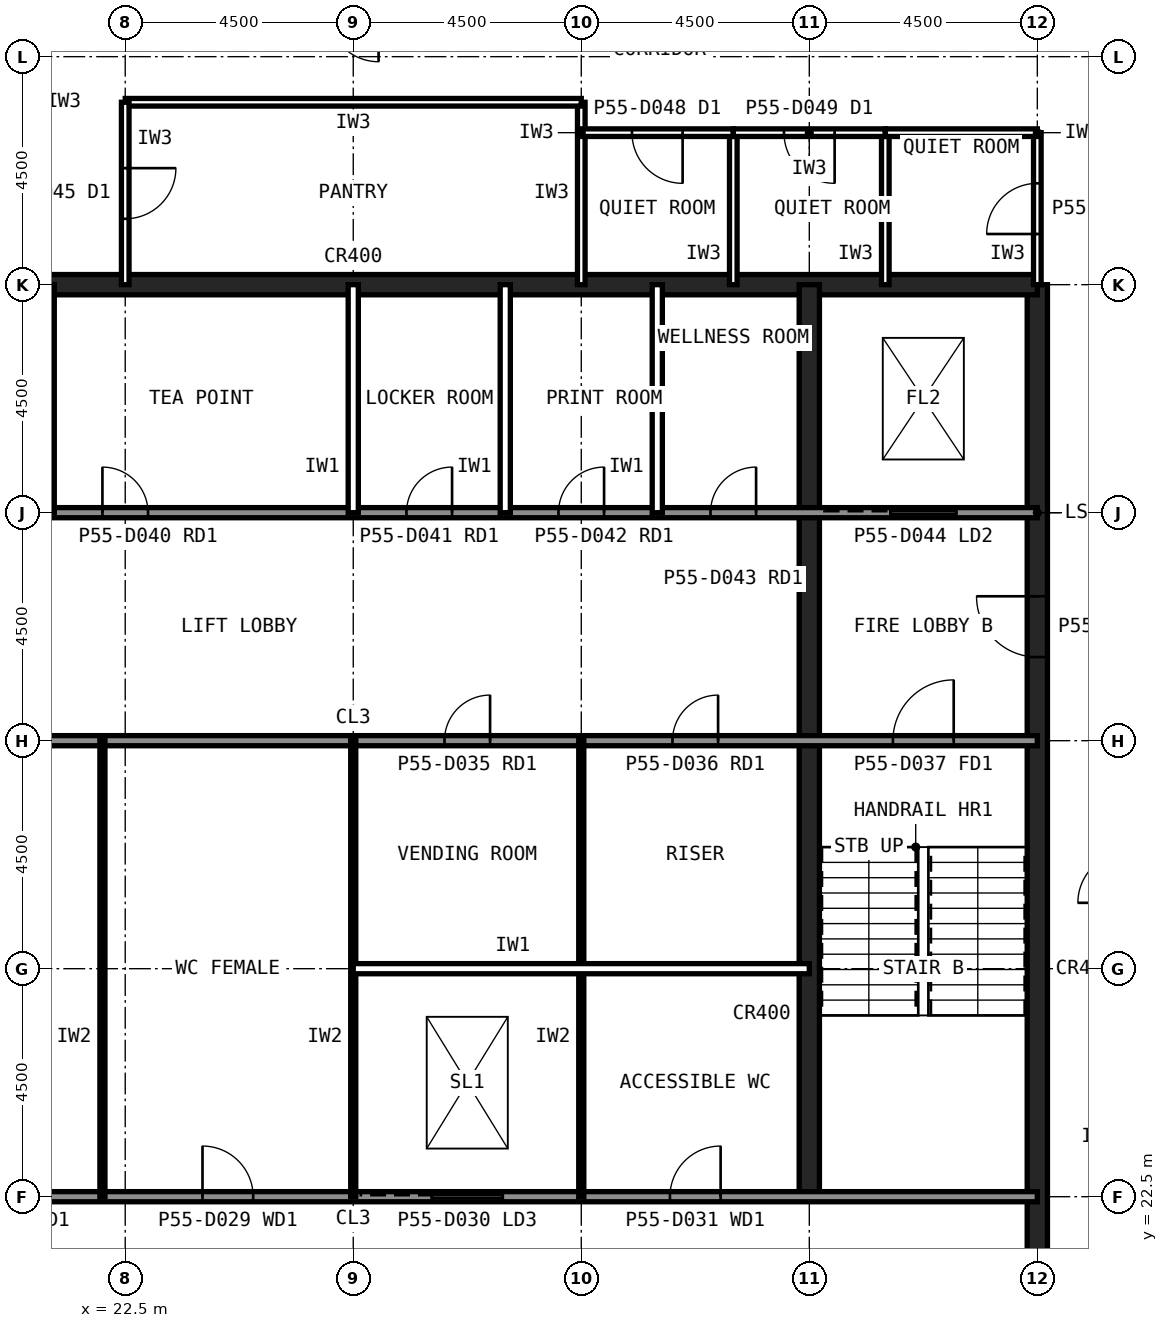
"""IFC4 building model, lengths in metres.
Left out: names, types, materials, properties, quantities, classifications, styles, units other than length and angle.
Written with IfcOpenShell. Run it as: python <this file> out.ifc"""

import sys

from ifc_helpers import new_model, si_unit, direction, frame, frame_2d, origin, place, context, subcontext, project, spatial, rectangle, extrude, element, fill, save


model = new_model("IFC4")
c1 = context("Model", 3, precision=1e-05, world=origin(), true_north=direction((0.0, 1.0)))
c2 = subcontext(c1, "Body", "Model", "MODEL_VIEW")
j1 = project(units=[si_unit("LENGTHUNIT", "METRE"), si_unit("PLANEANGLEUNIT", "RADIAN")], contexts=[c1])
p1 = place(None, origin())
s1 = spatial("IfcSite", under=j1, at=p1, CompositionType="ELEMENT")
p2 = place(p1, origin())
s2 = spatial("IfcBuilding", under=s1, at=p2, CompositionType="ELEMENT")
p3 = place(p2, frame((0.0, 0.0, 230.6)))
s3 = spatial("IfcBuildingStorey", under=s2, at=p3, CompositionType="ELEMENT", Elevation=230.6)
p4 = place(p3, frame((40.5, 13.5, 0.0), z_axis=(0.0, 0.0, 1.0), x_axis=(0.0, 1.0, 0.0)))
e1 = element("IfcWall", 1, at=p4, inside=s3, PredefinedType="SHEAR", context=c2, shape_type="SweptSolid", body=[
    extrude(rectangle(XDim=27.0, YDim=0.4, at=frame_2d((13.5, 0.0))), origin(), (0.0, 0.0, 1.0), 4.0),
])
p5 = place(p4, frame((5.85, 0.0, 0.0)))
e2 = element("IfcOpeningElement", 2, at=p5, cuts=e1, PredefinedType="OPENING", context=c2, shape_type="SweptSolid", body=[
    extrude(rectangle(XDim=1.8, YDim=2.1, at=frame_2d((0.9, 1.05))), frame((0.0, 0.21, 0.0), z_axis=(0.0, -1.0, 0.0), x_axis=(1.0, 0.0, 0.0)), (0.0, 0.0, 1.0), 0.42),
])
p6 = place(p4, frame((19.65, 0.0, 0.0)))
e3 = element("IfcOpeningElement", 3, at=p6, cuts=e1, PredefinedType="OPENING", context=c2, shape_type="SweptSolid", body=[
    extrude(rectangle(XDim=1.2, YDim=2.1, at=frame_2d((0.6, 1.05))), frame((0.0, 0.21, 0.0), z_axis=(0.0, -1.0, 0.0), x_axis=(1.0, 0.0, 0.0)), (0.0, 0.0, 1.0), 0.42),
])
p7 = place(p3, frame((40.5, 40.5, 0.0), z_axis=(0.0, 0.0, 1.0), x_axis=(-1.0, 0.0, 0.0)))
e4 = element("IfcWall", 4, at=p7, inside=s3, PredefinedType="SHEAR", context=c2, shape_type="SweptSolid", body=[
    extrude(rectangle(XDim=27.0, YDim=0.4, at=frame_2d((13.5, 0.0))), origin(), (0.0, 0.0, 1.0), 4.0),
])
p8 = place(p3, frame((36.0, 22.5, 0.0), z_axis=(0.0, 0.0, 1.0), x_axis=(0.0, 1.0, 0.0)))
e5 = element("IfcWall", 5, at=p8, inside=s3, PredefinedType="SHEAR", context=c2, shape_type="SweptSolid", body=[
    extrude(rectangle(XDim=18.0, YDim=0.4, at=frame_2d((9.0, 0.0))), origin(), (0.0, 0.0, 1.0), 4.0),
])
p9 = place(p3, frame((13.5, 36.0, 0.0), z_axis=(0.0, 0.0, 1.0), x_axis=(1.0, 0.0, 0.0)))
e6 = element("IfcWall", 6, at=p9, inside=s3, PredefinedType="SOLIDWALL", context=c2, shape_type="SweptSolid", body=[
    extrude(rectangle(XDim=27.0, YDim=0.2, at=frame_2d((13.5, 0.0))), origin(), (0.0, 0.0, 1.0), 3.84),
])
p10 = place(p9, frame((1.8, 0.0, 0.0)))
e7 = element("IfcOpeningElement", 7, at=p10, cuts=e6, PredefinedType="OPENING", context=c2, shape_type="SweptSolid", body=[
    extrude(rectangle(XDim=0.9, YDim=2.1, at=frame_2d((0.45, 1.05))), frame((0.0, 0.11, 0.0), z_axis=(0.0, -1.0, 0.0), x_axis=(1.0, 0.0, 0.0)), (0.0, 0.0, 1.0), 0.22),
])
p11 = place(p9, frame((5.55, 0.0, 0.0)))
e8 = element("IfcOpeningElement", 8, at=p11, cuts=e6, PredefinedType="OPENING", context=c2, shape_type="SweptSolid", body=[
    extrude(rectangle(XDim=0.9, YDim=2.1, at=frame_2d((0.45, 1.05))), frame((0.0, 0.11, 0.0), z_axis=(0.0, -1.0, 0.0), x_axis=(1.0, 0.0, 0.0)), (0.0, 0.0, 1.0), 0.22),
])
p12 = place(p9, frame((11.55, 0.0, 0.0)))
e9 = element("IfcOpeningElement", 9, at=p12, cuts=e6, PredefinedType="OPENING", context=c2, shape_type="SweptSolid", body=[
    extrude(rectangle(XDim=0.9, YDim=2.1, at=frame_2d((0.45, 1.05))), frame((0.0, 0.11, 0.0), z_axis=(0.0, -1.0, 0.0), x_axis=(1.0, 0.0, 0.0)), (0.0, 0.0, 1.0), 0.22),
])
p13 = place(p9, frame((14.55, 0.0, 0.0)))
e10 = element("IfcOpeningElement", 10, at=p13, cuts=e6, PredefinedType="OPENING", context=c2, shape_type="SweptSolid", body=[
    extrude(rectangle(XDim=0.9, YDim=2.1, at=frame_2d((0.45, 1.05))), frame((0.0, 0.11, 0.0), z_axis=(0.0, -1.0, 0.0), x_axis=(1.0, 0.0, 0.0)), (0.0, 0.0, 1.0), 0.22),
])
p14 = place(p9, frame((24.1, 0.0, 0.0)))
e11 = element("IfcOpeningElement", 11, at=p14, cuts=e6, PredefinedType="OPENING", context=c2, shape_type="SweptSolid", body=[
    extrude(rectangle(XDim=1.3, YDim=2.2, at=frame_2d((0.65, 1.1))), frame((0.0, 0.11, 0.0), z_axis=(0.0, -1.0, 0.0), x_axis=(1.0, 0.0, 0.0)), (0.0, 0.0, 1.0), 0.22),
])
p15 = place(p3, frame((13.5, 22.5, 0.0), z_axis=(0.0, 0.0, 1.0), x_axis=(1.0, 0.0, 0.0)))
e12 = element("IfcWall", 12, at=p15, inside=s3, PredefinedType="SOLIDWALL", context=c2, shape_type="SweptSolid", body=[
    extrude(rectangle(XDim=27.0, YDim=0.2, at=frame_2d((13.5, 0.0))), origin(), (0.0, 0.0, 1.0), 3.84),
])
p16 = place(p15, frame((1.65, 0.0, 0.0)))
e13 = element("IfcOpeningElement", 13, at=p16, cuts=e12, PredefinedType="OPENING", context=c2, shape_type="SweptSolid", body=[
    extrude(rectangle(XDim=1.2, YDim=2.1, at=frame_2d((0.6, 1.05))), frame((0.0, 0.11, 0.0), z_axis=(0.0, -1.0, 0.0), x_axis=(1.0, 0.0, 0.0)), (0.0, 0.0, 1.0), 0.22),
])
p17 = place(p15, frame((6.025, 0.0, 0.0)))
e14 = element("IfcOpeningElement", 14, at=p17, cuts=e12, PredefinedType="OPENING", context=c2, shape_type="SweptSolid", body=[
    extrude(rectangle(XDim=1.0, YDim=2.1, at=frame_2d((0.5, 1.05))), frame((0.0, 0.11, 0.0), z_axis=(0.0, -1.0, 0.0), x_axis=(1.0, 0.0, 0.0)), (0.0, 0.0, 1.0), 0.22),
])
p18 = place(p15, frame((10.525, 0.0, 0.0)))
e15 = element("IfcOpeningElement", 15, at=p18, cuts=e12, PredefinedType="OPENING", context=c2, shape_type="SweptSolid", body=[
    extrude(rectangle(XDim=1.0, YDim=2.1, at=frame_2d((0.5, 1.05))), frame((0.0, 0.11, 0.0), z_axis=(0.0, -1.0, 0.0), x_axis=(1.0, 0.0, 0.0)), (0.0, 0.0, 1.0), 0.22),
])
p19 = place(p15, frame((19.75, 0.0, 0.0)))
e16 = element("IfcOpeningElement", 16, at=p19, cuts=e12, PredefinedType="OPENING", context=c2, shape_type="SweptSolid", body=[
    extrude(rectangle(XDim=1.0, YDim=2.1, at=frame_2d((0.5, 1.05))), frame((0.0, 0.11, 0.0), z_axis=(0.0, -1.0, 0.0), x_axis=(1.0, 0.0, 0.0)), (0.0, 0.0, 1.0), 0.22),
])
p20 = place(p15, frame((15.05, 0.0, 0.0)))
e17 = element("IfcOpeningElement", 17, at=p20, cuts=e12, PredefinedType="OPENING", context=c2, shape_type="SweptSolid", body=[
    extrude(rectangle(XDim=1.4, YDim=2.4, at=frame_2d((0.7, 1.2))), frame((0.0, 0.11, 0.0), z_axis=(0.0, -1.0, 0.0), x_axis=(1.0, 0.0, 0.0)), (0.0, 0.0, 1.0), 0.22),
])
p21 = place(p3, frame((13.5, 31.5, 0.0), z_axis=(0.0, 0.0, 1.0), x_axis=(1.0, 0.0, 0.0)))
e18 = element("IfcWall", 18, at=p21, inside=s3, PredefinedType="SOLIDWALL", context=c2, shape_type="SweptSolid", body=[
    extrude(rectangle(XDim=27.0, YDim=0.2, at=frame_2d((13.5, 0.0))), origin(), (0.0, 0.0, 1.0), 3.84),
])
p22 = place(p21, frame((24.15, 0.0, 0.0)))
e19 = element("IfcOpeningElement", 19, at=p22, cuts=e18, PredefinedType="OPENING", context=c2, shape_type="SweptSolid", body=[
    extrude(rectangle(XDim=1.2, YDim=2.1, at=frame_2d((0.6, 1.05))), frame((0.0, 0.11, 0.0), z_axis=(0.0, -1.0, 0.0), x_axis=(1.0, 0.0, 0.0)), (0.0, 0.0, 1.0), 0.22),
])
p23 = place(p21, frame((15.3, 0.0, 0.0)))
e20 = element("IfcOpeningElement", 20, at=p23, cuts=e18, PredefinedType="OPENING", context=c2, shape_type="SweptSolid", body=[
    extrude(rectangle(XDim=0.9, YDim=2.1, at=frame_2d((0.45, 1.05))), frame((0.0, 0.11, 0.0), z_axis=(0.0, -1.0, 0.0), x_axis=(1.0, 0.0, 0.0)), (0.0, 0.0, 1.0), 0.22),
])
p24 = place(p21, frame((19.8, 0.0, 0.0)))
e21 = element("IfcOpeningElement", 21, at=p24, cuts=e18, PredefinedType="OPENING", context=c2, shape_type="SweptSolid", body=[
    extrude(rectangle(XDim=0.9, YDim=2.1, at=frame_2d((0.45, 1.05))), frame((0.0, 0.11, 0.0), z_axis=(0.0, -1.0, 0.0), x_axis=(1.0, 0.0, 0.0)), (0.0, 0.0, 1.0), 0.22),
])
for number, where, z_axis, x_axis in (
    (22, (24.0, 36.0, 0.0), (0.0, 0.0, 1.0), (0.0, 1.0, 0.0)),
    (23, (27.0, 36.0, 0.0), (0.0, 0.0, 1.0), (0.0, 1.0, 0.0)),
):
    element("IfcWall", number, at=place(p3, frame(where, z_axis=z_axis, x_axis=x_axis)), inside=s3, PredefinedType="PARTITIONING", context=c2, shape_type="SweptSolid", body=[
        extrude(rectangle(XDim=4.5, YDim=0.2, at=frame_2d((2.25, 0.0))), origin(), (0.0, 0.0, 1.0), 3.84),
    ])
for number, where, z_axis, x_axis in (
    (24, (22.05, 22.5, 0.0), (0.0, 0.0, 1.0), (0.0, 1.0, 0.0)),
    (25, (27.0, 22.5, 0.0), (0.0, 0.0, 1.0), (0.0, 1.0, 0.0)),
    (26, (31.5, 22.5, 0.0), (0.0, 0.0, 1.0), (0.0, 1.0, 0.0)),
):
    element("IfcWall", number, at=place(p3, frame(where, z_axis=z_axis, x_axis=x_axis)), inside=s3, PredefinedType="PLUMBINGWALL", context=c2, shape_type="SweptSolid", body=[
        extrude(rectangle(XDim=9.0, YDim=0.1, at=frame_2d((4.5, 0.0))), origin(), (0.0, 0.0, 1.0), 3.84),
    ])
p25 = place(p3, frame((27.0, 27.0, 0.0), z_axis=(0.0, 0.0, 1.0), x_axis=(1.0, 0.0, 0.0)))
e27 = element("IfcWall", 27, at=p25, inside=s3, PredefinedType="PARTITIONING", context=c2, shape_type="SweptSolid", body=[
    extrude(rectangle(XDim=9.0, YDim=0.2, at=frame_2d((4.5, 0.0))), origin(), (0.0, 0.0, 1.0), 3.84),
])
p26 = place(p3, frame((31.5, 40.5, 0.0), z_axis=(0.0, 0.0, 1.0), x_axis=(0.0, 1.0, 0.0)))
e28 = element("IfcWall", 28, at=p26, inside=s3, PredefinedType="PARTITIONING", context=c2, shape_type="SweptSolid", body=[
    extrude(rectangle(XDim=3.6, YDim=0.15, at=frame_2d((1.8, 0.0))), origin(), (0.0, 0.0, 1.0), 2.989),
])
p27 = place(p3, frame((31.5, 44.1, 0.0), z_axis=(0.0, 0.0, 1.0), x_axis=(-1.0, 0.0, 0.0)))
e29 = element("IfcWall", 29, at=p27, inside=s3, PredefinedType="PARTITIONING", context=c2, shape_type="SweptSolid", body=[
    extrude(rectangle(XDim=9.0, YDim=0.15, at=frame_2d((4.5, 0.0))), origin(), (0.0, 0.0, 1.0), 3.84),
])
p28 = place(p3, frame((22.5, 44.1, 0.0), z_axis=(0.0, 0.0, 1.0), x_axis=(0.0, -1.0, 0.0)))
e30 = element("IfcWall", 30, at=p28, inside=s3, PredefinedType="PARTITIONING", context=c2, shape_type="SweptSolid", body=[
    extrude(rectangle(XDim=3.6, YDim=0.15, at=frame_2d((1.8, 0.0))), origin(), (0.0, 0.0, 1.0), 2.989),
])
p29 = place(p28, frame((1.3, 0.0, 0.0)))
e31 = element("IfcOpeningElement", 31, at=p29, cuts=e30, PredefinedType="OPENING", context=c2, shape_type="SweptSolid", body=[
    extrude(rectangle(XDim=1.0, YDim=2.1, at=frame_2d((0.5, 1.05))), frame((0.0, 0.085, 0.0), z_axis=(0.0, -1.0, 0.0), x_axis=(1.0, 0.0, 0.0)), (0.0, 0.0, 1.0), 0.17),
])
p30 = place(p3, frame((34.5, 40.5, 0.0), z_axis=(0.0, 0.0, 1.0), x_axis=(0.0, 1.0, 0.0)))
e32 = element("IfcWall", 32, at=p30, inside=s3, PredefinedType="PARTITIONING", context=c2, shape_type="SweptSolid", body=[
    extrude(rectangle(XDim=3.0, YDim=0.15, at=frame_2d((1.5, 0.0))), origin(), (0.0, 0.0, 1.0), 3.84),
])
p31 = place(p3, frame((34.5, 43.5, 0.0), z_axis=(0.0, 0.0, 1.0), x_axis=(-1.0, 0.0, 0.0)))
e33 = element("IfcWall", 33, at=p31, inside=s3, PredefinedType="PARTITIONING", context=c2, shape_type="SweptSolid", body=[
    extrude(rectangle(XDim=3.0, YDim=0.15, at=frame_2d((1.5, 0.0))), origin(), (0.0, 0.0, 1.0), 3.84),
])
p32 = place(p31, frame((1.0, 0.0, 0.0)))
e34 = element("IfcOpeningElement", 34, at=p32, cuts=e33, PredefinedType="OPENING", context=c2, shape_type="SweptSolid", body=[
    extrude(rectangle(XDim=1.0, YDim=2.1, at=frame_2d((0.5, 1.05))), frame((0.0, 0.085, 0.0), z_axis=(0.0, -1.0, 0.0), x_axis=(1.0, 0.0, 0.0)), (0.0, 0.0, 1.0), 0.17),
])
p33 = place(p3, frame((37.5, 40.5, 0.0), z_axis=(0.0, 0.0, 1.0), x_axis=(0.0, 1.0, 0.0)))
e35 = element("IfcWall", 35, at=p33, inside=s3, PredefinedType="PARTITIONING", context=c2, shape_type="SweptSolid", body=[
    extrude(rectangle(XDim=3.0, YDim=0.15, at=frame_2d((1.5, 0.0))), origin(), (0.0, 0.0, 1.0), 3.84),
])
p34 = place(p3, frame((37.5, 43.5, 0.0), z_axis=(0.0, 0.0, 1.0), x_axis=(-1.0, 0.0, 0.0)))
e36 = element("IfcWall", 36, at=p34, inside=s3, PredefinedType="PARTITIONING", context=c2, shape_type="SweptSolid", body=[
    extrude(rectangle(XDim=3.0, YDim=0.15, at=frame_2d((1.5, 0.0))), origin(), (0.0, 0.0, 1.0), 3.84),
])
p35 = place(p34, frame((1.0, 0.0, 0.0)))
e37 = element("IfcOpeningElement", 37, at=p35, cuts=e36, PredefinedType="OPENING", context=c2, shape_type="SweptSolid", body=[
    extrude(rectangle(XDim=1.0, YDim=2.1, at=frame_2d((0.5, 1.05))), frame((0.0, 0.085, 0.0), z_axis=(0.0, -1.0, 0.0), x_axis=(1.0, 0.0, 0.0)), (0.0, 0.0, 1.0), 0.17),
])
p36 = place(p3, frame((40.5, 40.5, 0.0), z_axis=(0.0, 0.0, 1.0), x_axis=(0.0, 1.0, 0.0)))
e38 = element("IfcWall", 38, at=p36, inside=s3, PredefinedType="PARTITIONING", context=c2, shape_type="SweptSolid", body=[
    extrude(rectangle(XDim=3.0, YDim=0.15, at=frame_2d((1.5, 0.0))), origin(), (0.0, 0.0, 1.0), 2.989),
])
p37 = place(p36, frame((1.0, 0.0, 0.0)))
e39 = element("IfcOpeningElement", 39, at=p37, cuts=e38, PredefinedType="OPENING", context=c2, shape_type="SweptSolid", body=[
    extrude(rectangle(XDim=1.0, YDim=2.1, at=frame_2d((0.5, 1.05))), frame((0.0, 0.085, 0.0), z_axis=(0.0, -1.0, 0.0), x_axis=(1.0, 0.0, 0.0)), (0.0, 0.0, 1.0), 0.17),
])
p38 = place(p3, frame((40.5, 43.5, 0.0), z_axis=(0.0, 0.0, 1.0), x_axis=(-1.0, 0.0, 0.0)))
e40 = element("IfcWall", 40, at=p38, inside=s3, PredefinedType="PARTITIONING", context=c2, shape_type="SweptSolid", body=[
    extrude(rectangle(XDim=3.0, YDim=0.15, at=frame_2d((1.5, 0.0))), origin(), (0.0, 0.0, 1.0), 3.84),
])
p39 = place(p6, origin())
e41 = element("IfcDoor", 41, at=p39, inside=s3, OperationType="SINGLE_SWING_RIGHT", PredefinedType="DOOR", context=c2, shape_type="SweptSolid", body=[
    extrude(rectangle(XDim=1.2, YDim=2.1, at=frame_2d((0.6, 1.05))), frame((0.0, 0.025, 0.0), z_axis=(0.0, -1.0, 0.0), x_axis=(1.0, 0.0, 0.0)), (0.0, 0.0, 1.0), 0.05),
])
fill(e3, e41)
p40 = place(p22, origin())
e42 = element("IfcDoor", 42, at=p40, inside=s3, OperationType="SINGLE_SWING_RIGHT", PredefinedType="DOOR", context=c2, shape_type="SweptSolid", body=[
    extrude(rectangle(XDim=1.2, YDim=2.1, at=frame_2d((0.6, 1.05))), frame((0.0, 0.025, 0.0), z_axis=(0.0, -1.0, 0.0), x_axis=(1.0, 0.0, 0.0)), (0.0, 0.0, 1.0), 0.05),
])
fill(e19, e42)
p41 = place(p18, origin())
e43 = element("IfcDoor", 43, at=p41, inside=s3, OperationType="SINGLE_SWING_LEFT", PredefinedType="DOOR", context=c2, shape_type="SweptSolid", body=[
    extrude(rectangle(XDim=1.0, YDim=2.1, at=frame_2d((0.5, 1.05))), frame((0.0, 0.025, 0.0), z_axis=(0.0, -1.0, 0.0), x_axis=(1.0, 0.0, 0.0)), (0.0, 0.0, 1.0), 0.05),
])
fill(e15, e43)
p42 = place(p19, origin())
e44 = element("IfcDoor", 44, at=p42, inside=s3, OperationType="SINGLE_SWING_RIGHT", PredefinedType="DOOR", context=c2, shape_type="SweptSolid", body=[
    extrude(rectangle(XDim=1.0, YDim=2.1, at=frame_2d((0.5, 1.05))), frame((0.0, 0.025, 0.0), z_axis=(0.0, -1.0, 0.0), x_axis=(1.0, 0.0, 0.0)), (0.0, 0.0, 1.0), 0.05),
])
fill(e16, e44)
p43 = place(p23, origin())
e45 = element("IfcDoor", 45, at=p43, inside=s3, OperationType="SINGLE_SWING_RIGHT", PredefinedType="DOOR", context=c2, shape_type="SweptSolid", body=[
    extrude(rectangle(XDim=0.9, YDim=2.1, at=frame_2d((0.45, 1.05))), frame((0.0, 0.025, 0.0), z_axis=(0.0, -1.0, 0.0), x_axis=(1.0, 0.0, 0.0)), (0.0, 0.0, 1.0), 0.05),
])
fill(e20, e45)
p44 = place(p24, origin())
e46 = element("IfcDoor", 46, at=p44, inside=s3, OperationType="SINGLE_SWING_RIGHT", PredefinedType="DOOR", context=c2, shape_type="SweptSolid", body=[
    extrude(rectangle(XDim=0.9, YDim=2.1, at=frame_2d((0.45, 1.05))), frame((0.0, 0.025, 0.0), z_axis=(0.0, -1.0, 0.0), x_axis=(1.0, 0.0, 0.0)), (0.0, 0.0, 1.0), 0.05),
])
fill(e21, e46)
p45 = place(p12, origin())
e47 = element("IfcDoor", 47, at=p45, inside=s3, OperationType="SINGLE_SWING_LEFT", PredefinedType="DOOR", context=c2, shape_type="SweptSolid", body=[
    extrude(rectangle(XDim=0.9, YDim=2.1, at=frame_2d((0.45, 1.05))), frame((0.0, 0.025, 0.0), z_axis=(0.0, -1.0, 0.0), x_axis=(1.0, 0.0, 0.0)), (0.0, 0.0, 1.0), 0.05),
])
fill(e9, e47)
p46 = place(p13, origin())
e48 = element("IfcDoor", 48, at=p46, inside=s3, OperationType="SINGLE_SWING_RIGHT", PredefinedType="DOOR", context=c2, shape_type="SweptSolid", body=[
    extrude(rectangle(XDim=0.9, YDim=2.1, at=frame_2d((0.45, 1.05))), frame((0.0, 0.025, 0.0), z_axis=(0.0, -1.0, 0.0), x_axis=(1.0, 0.0, 0.0)), (0.0, 0.0, 1.0), 0.05),
])
fill(e10, e48)
p47 = place(p14, origin())
e49 = element("IfcDoor", 49, at=p47, inside=s3, OperationType="SLIDING_TO_LEFT", PredefinedType="DOOR", context=c2, shape_type="SweptSolid", body=[
    extrude(rectangle(XDim=1.3, YDim=2.2, at=frame_2d((0.65, 1.1))), frame((0.0, 0.025, 0.0), z_axis=(0.0, -1.0, 0.0), x_axis=(1.0, 0.0, 0.0)), (0.0, 0.0, 1.0), 0.05),
])
fill(e11, e49)
p48 = place(p20, origin())
e50 = element("IfcDoor", 50, at=p48, inside=s3, OperationType="SLIDING_TO_LEFT", PredefinedType="DOOR", context=c2, shape_type="SweptSolid", body=[
    extrude(rectangle(XDim=1.4, YDim=2.4, at=frame_2d((0.7, 1.2))), frame((0.0, 0.025, 0.0), z_axis=(0.0, -1.0, 0.0), x_axis=(1.0, 0.0, 0.0)), (0.0, 0.0, 1.0), 0.05),
])
fill(e17, e50)
p49 = place(p29, origin())
e51 = element("IfcDoor", 51, at=p49, inside=s3, OperationType="SINGLE_SWING_LEFT", PredefinedType="DOOR", context=c2, shape_type="SweptSolid", body=[
    extrude(rectangle(XDim=1.0, YDim=2.1, at=frame_2d((0.5, 1.05))), frame((0.0, 0.025, 0.0), z_axis=(0.0, -1.0, 0.0), x_axis=(1.0, 0.0, 0.0)), (0.0, 0.0, 1.0), 0.05),
])
fill(e31, e51)
p50 = place(p32, origin())
e52 = element("IfcDoor", 52, at=p50, inside=s3, OperationType="SINGLE_SWING_LEFT", PredefinedType="DOOR", context=c2, shape_type="SweptSolid", body=[
    extrude(rectangle(XDim=1.0, YDim=2.1, at=frame_2d((0.5, 1.05))), frame((0.0, 0.025, 0.0), z_axis=(0.0, -1.0, 0.0), x_axis=(1.0, 0.0, 0.0)), (0.0, 0.0, 1.0), 0.05),
])
fill(e34, e52)
p51 = place(p35, origin())
e53 = element("IfcDoor", 53, at=p51, inside=s3, OperationType="SINGLE_SWING_LEFT", PredefinedType="DOOR", context=c2, shape_type="SweptSolid", body=[
    extrude(rectangle(XDim=1.0, YDim=2.1, at=frame_2d((0.5, 1.05))), frame((0.0, 0.025, 0.0), z_axis=(0.0, -1.0, 0.0), x_axis=(1.0, 0.0, 0.0)), (0.0, 0.0, 1.0), 0.05),
])
fill(e37, e53)
p52 = place(p37, origin())
e54 = element("IfcDoor", 54, at=p52, inside=s3, OperationType="SINGLE_SWING_LEFT", PredefinedType="DOOR", context=c2, shape_type="SweptSolid", body=[
    extrude(rectangle(XDim=1.0, YDim=2.1, at=frame_2d((0.5, 1.05))), frame((0.0, 0.025, 0.0), z_axis=(0.0, -1.0, 0.0), x_axis=(1.0, 0.0, 0.0)), (0.0, 0.0, 1.0), 0.05),
])
fill(e39, e54)
save(model, sys.argv[1])
